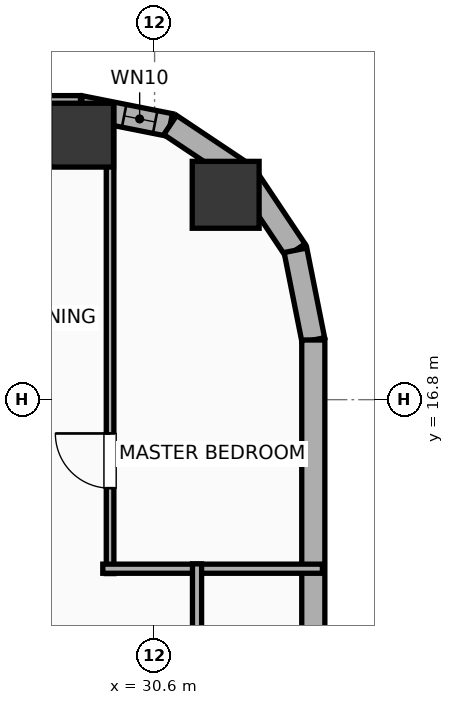
"""IFC4 building model, lengths in metres.
Left out: names, types, materials, properties, quantities, classifications, styles, units other than length and angle.
Written with IfcOpenShell. Run it as: python <this file> out.ifc"""

import sys

from ifc_helpers import new_model, si_unit, direction, frame, frame_2d, origin, origin_2d, place, context, subcontext, project, spatial, rectangle, hollow_rectangle, hollow_circle, extrude, element, fill, save


model = new_model("IFC4")
c1 = context("Model", 3, precision=1e-05, world=origin(), true_north=direction((0.0, 1.0)))
c2 = subcontext(c1, "Body", "Model", "MODEL_VIEW")
j1 = project(units=[si_unit("LENGTHUNIT", "METRE"), si_unit("PLANEANGLEUNIT", "RADIAN")], contexts=[c1])
p1 = place(None, origin())
s1 = spatial("IfcSite", under=j1, at=p1, CompositionType="ELEMENT")
p2 = place(p1, origin())
s2 = spatial("IfcBuilding", under=s1, at=p2, CompositionType="ELEMENT")
p3 = place(p2, frame((0.0, 0.0, 109.2)))
s3 = spatial("IfcBuildingStorey", under=s2, at=p3, CompositionType="ELEMENT", Elevation=109.2)
p4 = place(p3, frame((31.769, 20.169, 0.0), z_axis=(0.0, 0.0, 1.0), x_axis=(1.0, 0.0, 0.0)))
e1 = element("IfcColumn", 1, at=p4, inside=s3, PredefinedType="COLUMN", context=c2, shape_type="SweptSolid", body=[
    extrude(hollow_circle(Radius=0.55, WallThickness=0.036, at=origin_2d()), origin(), (0.0, 0.0, 1.0), 3.9),
])
p5 = place(p3, frame((29.4, 21.15, 0.0), z_axis=(0.0, 0.0, 1.0), x_axis=(1.0, 0.0, 0.0)))
e2 = element("IfcColumn", 2, at=p5, inside=s3, PredefinedType="COLUMN", context=c2, shape_type="SweptSolid", body=[
    extrude(hollow_rectangle(XDim=1.05, YDim=1.05, WallThickness=0.036, at=origin_2d()), origin(), (0.0, 0.0, 1.0), 3.9),
])
p6 = place(p3, frame((-25.381, 21.61, 0.0), z_axis=(0.0, 0.0, 1.0), x_axis=(1.0, 0.0, 0.0)))
e3 = element("IfcWall", 3, at=p6, inside=s3, PredefinedType="ELEMENTEDWALL", context=c2, shape_type="SweptSolid", body=[
    extrude(rectangle(XDim=54.763, YDim=0.38, at=frame_2d((27.381, 0.0))), origin(), (0.0, 0.0, 1.0), 3.65),
])
p7 = place(p6, frame((5.645, 0.0, 0.75)))
e4 = element("IfcOpeningElement", 4, at=p7, cuts=e3, PredefinedType="OPENING", context=c2, shape_type="SweptSolid", body=[
    extrude(rectangle(XDim=2.4, YDim=2.1, at=frame_2d((1.2, 1.05))), frame((0.0, 0.2, 0.0), z_axis=(0.0, -1.0, 0.0), x_axis=(1.0, 0.0, 0.0)), (0.0, 0.0, 1.0), 0.4),
])
p8 = place(p6, frame((45.067, 0.0, 0.75)))
e5 = element("IfcOpeningElement", 5, at=p8, cuts=e3, PredefinedType="OPENING", context=c2, shape_type="SweptSolid", body=[
    extrude(rectangle(XDim=2.4, YDim=2.1, at=frame_2d((1.2, 1.05))), frame((0.0, 0.2, 0.0), z_axis=(0.0, -1.0, 0.0), x_axis=(1.0, 0.0, 0.0)), (0.0, 0.0, 1.0), 0.4),
])
p9 = place(p6, frame((1.831, 0.0, 0.75)))
e6 = element("IfcOpeningElement", 6, at=p9, cuts=e3, PredefinedType="OPENING", context=c2, shape_type="SweptSolid", body=[
    extrude(rectangle(XDim=1.2, YDim=2.05, at=frame_2d((0.6, 1.025))), frame((0.0, 0.2, 0.0), z_axis=(0.0, -1.0, 0.0), x_axis=(1.0, 0.0, 0.0)), (0.0, 0.0, 1.0), 0.4),
])
p10 = place(p6, frame((8.996, 0.0, 0.75)))
e7 = element("IfcOpeningElement", 7, at=p10, cuts=e3, PredefinedType="OPENING", context=c2, shape_type="SweptSolid", body=[
    extrude(rectangle(XDim=1.2, YDim=2.05, at=frame_2d((0.6, 1.025))), frame((0.0, 0.2, 0.0), z_axis=(0.0, -1.0, 0.0), x_axis=(1.0, 0.0, 0.0)), (0.0, 0.0, 1.0), 0.4),
])
p11 = place(p6, frame((15.102, 0.0, 0.75)))
e8 = element("IfcOpeningElement", 8, at=p11, cuts=e3, PredefinedType="OPENING", context=c2, shape_type="SweptSolid", body=[
    extrude(rectangle(XDim=1.2, YDim=2.05, at=frame_2d((0.6, 1.025))), frame((0.0, 0.2, 0.0), z_axis=(0.0, -1.0, 0.0), x_axis=(1.0, 0.0, 0.0)), (0.0, 0.0, 1.0), 0.4),
])
p12 = place(p6, frame((12.352, 0.0, 0.75)))
e9 = element("IfcOpeningElement", 9, at=p12, cuts=e3, PredefinedType="OPENING", context=c2, shape_type="SweptSolid", body=[
    extrude(rectangle(XDim=1.2, YDim=2.05, at=frame_2d((0.6, 1.025))), frame((0.0, 0.2, 0.0), z_axis=(0.0, -1.0, 0.0), x_axis=(1.0, 0.0, 0.0)), (0.0, 0.0, 1.0), 0.4),
])
p13 = place(p6, frame((19.936, 0.0, 0.75)))
e10 = element("IfcOpeningElement", 10, at=p13, cuts=e3, PredefinedType="OPENING", context=c2, shape_type="SweptSolid", body=[
    extrude(rectangle(XDim=1.2, YDim=2.05, at=frame_2d((0.6, 1.025))), frame((0.0, 0.2, 0.0), z_axis=(0.0, -1.0, 0.0), x_axis=(1.0, 0.0, 0.0)), (0.0, 0.0, 1.0), 0.4),
])
p14 = place(p6, frame((17.786, 0.0, 0.75)))
e11 = element("IfcOpeningElement", 11, at=p14, cuts=e3, PredefinedType="OPENING", context=c2, shape_type="SweptSolid", body=[
    extrude(rectangle(XDim=1.2, YDim=2.05, at=frame_2d((0.6, 1.025))), frame((0.0, 0.2, 0.0), z_axis=(0.0, -1.0, 0.0), x_axis=(1.0, 0.0, 0.0)), (0.0, 0.0, 1.0), 0.4),
])
p15 = place(p6, frame((23.826, 0.0, 0.75)))
e12 = element("IfcOpeningElement", 12, at=p15, cuts=e3, PredefinedType="OPENING", context=c2, shape_type="SweptSolid", body=[
    extrude(rectangle(XDim=1.2, YDim=2.05, at=frame_2d((0.6, 1.025))), frame((0.0, 0.2, 0.0), z_axis=(0.0, -1.0, 0.0), x_axis=(1.0, 0.0, 0.0)), (0.0, 0.0, 1.0), 0.4),
])
p16 = place(p6, frame((26.576, 0.0, 0.75)))
e13 = element("IfcOpeningElement", 13, at=p16, cuts=e3, PredefinedType="OPENING", context=c2, shape_type="SweptSolid", body=[
    extrude(rectangle(XDim=1.2, YDim=2.05, at=frame_2d((0.6, 1.025))), frame((0.0, 0.2, 0.0), z_axis=(0.0, -1.0, 0.0), x_axis=(1.0, 0.0, 0.0)), (0.0, 0.0, 1.0), 0.4),
])
p17 = place(p6, frame((30.431, 0.0, 0.75)))
e14 = element("IfcOpeningElement", 14, at=p17, cuts=e3, PredefinedType="OPENING", context=c2, shape_type="SweptSolid", body=[
    extrude(rectangle(XDim=1.2, YDim=2.05, at=frame_2d((0.6, 1.025))), frame((0.0, 0.2, 0.0), z_axis=(0.0, -1.0, 0.0), x_axis=(1.0, 0.0, 0.0)), (0.0, 0.0, 1.0), 0.4),
])
p18 = place(p6, frame((38.581, 0.0, 0.75)))
e15 = element("IfcOpeningElement", 15, at=p18, cuts=e3, PredefinedType="OPENING", context=c2, shape_type="SweptSolid", body=[
    extrude(rectangle(XDim=1.2, YDim=2.05, at=frame_2d((0.6, 1.025))), frame((0.0, 0.2, 0.0), z_axis=(0.0, -1.0, 0.0), x_axis=(1.0, 0.0, 0.0)), (0.0, 0.0, 1.0), 0.4),
])
p19 = place(p6, frame((34.786, 0.0, 0.75)))
e16 = element("IfcOpeningElement", 16, at=p19, cuts=e3, PredefinedType="OPENING", context=c2, shape_type="SweptSolid", body=[
    extrude(rectangle(XDim=1.2, YDim=2.05, at=frame_2d((0.6, 1.025))), frame((0.0, 0.2, 0.0), z_axis=(0.0, -1.0, 0.0), x_axis=(1.0, 0.0, 0.0)), (0.0, 0.0, 1.0), 0.4),
])
p20 = place(p6, frame((41.876, 0.0, 0.75)))
e17 = element("IfcOpeningElement", 17, at=p20, cuts=e3, PredefinedType="OPENING", context=c2, shape_type="SweptSolid", body=[
    extrude(rectangle(XDim=1.2, YDim=2.05, at=frame_2d((0.6, 1.025))), frame((0.0, 0.2, 0.0), z_axis=(0.0, -1.0, 0.0), x_axis=(1.0, 0.0, 0.0)), (0.0, 0.0, 1.0), 0.4),
])
p21 = place(p6, frame((49.385, 0.0, 0.75)))
e18 = element("IfcOpeningElement", 18, at=p21, cuts=e3, PredefinedType="OPENING", context=c2, shape_type="SweptSolid", body=[
    extrude(rectangle(XDim=1.2, YDim=2.05, at=frame_2d((0.6, 1.025))), frame((0.0, 0.2, 0.0), z_axis=(0.0, -1.0, 0.0), x_axis=(1.0, 0.0, 0.0)), (0.0, 0.0, 1.0), 0.4),
])
p22 = place(p6, frame((52.181, 0.0, 0.75)))
e19 = element("IfcOpeningElement", 19, at=p22, cuts=e3, PredefinedType="OPENING", context=c2, shape_type="SweptSolid", body=[
    extrude(rectangle(XDim=1.2, YDim=2.05, at=frame_2d((0.6, 1.025))), frame((0.0, 0.2, 0.0), z_axis=(0.0, -1.0, 0.0), x_axis=(1.0, 0.0, 0.0)), (0.0, 0.0, 1.0), 0.4),
])
p23 = place(p3, frame((29.381, 21.61, 0.0), z_axis=(0.0, 0.0, 1.0), x_axis=(0.980755066645, -0.195242155415, 0.0)))
e20 = element("IfcWall", 20, at=p23, inside=s3, PredefinedType="ELEMENTEDWALL", context=c2, shape_type="SweptSolid", body=[
    extrude(rectangle(XDim=1.504, YDim=0.38, at=frame_2d((0.752, 0.0))), origin(), (0.0, 0.0, 1.0), 3.65),
])
p24 = place(p23, frame((0.732, 0.0, 0.75)))
e21 = element("IfcOpeningElement", 21, at=p24, cuts=e20, PredefinedType="OPENING", context=c2, shape_type="SweptSolid", body=[
    extrude(rectangle(XDim=0.52, YDim=2.05, at=frame_2d((0.26, 1.025))), frame((0.0, 0.2, 0.0), z_axis=(0.0, -1.0, 0.0), x_axis=(1.0, 0.0, 0.0)), (0.0, 0.0, 1.0), 0.4),
])
p25 = place(p3, frame((30.857, 21.316, 0.0), z_axis=(0.0, 0.0, 1.0), x_axis=(0.831468045563, -0.555572577804, 0.0)))
e22 = element("IfcWall", 22, at=p25, inside=s3, PredefinedType="ELEMENTEDWALL", context=c2, shape_type="SweptSolid", body=[
    extrude(rectangle(XDim=1.485, YDim=0.38, at=frame_2d((0.742, 0.0))), origin(), (0.0, 0.0, 1.0), 3.65),
])
p26 = place(p3, frame((32.091, 20.491, 0.0), z_axis=(0.0, 0.0, 1.0), x_axis=(0.555610286119, -0.831442848281, 0.0)))
e23 = element("IfcWall", 23, at=p26, inside=s3, PredefinedType="ELEMENTEDWALL", context=c2, shape_type="SweptSolid", body=[
    extrude(rectangle(XDim=1.485, YDim=0.38, at=frame_2d((0.743, 0.0))), origin(), (0.0, 0.0, 1.0), 3.65),
])
p27 = place(p3, frame((32.917, 19.257, 0.0), z_axis=(0.0, 0.0, 1.0), x_axis=(0.195086038585, -0.980786132421, 0.0)))
e24 = element("IfcWall", 24, at=p27, inside=s3, PredefinedType="ELEMENTEDWALL", context=c2, shape_type="SweptSolid", body=[
    extrude(rectangle(XDim=1.504, YDim=0.38, at=frame_2d((0.752, 0.0))), origin(), (0.0, 0.0, 1.0), 3.65),
])
p28 = place(p3, frame((33.21, 17.781, 0.0), z_axis=(0.0, 0.0, 1.0), x_axis=(0.0, -1.0, 0.0)))
e25 = element("IfcWall", 25, at=p28, inside=s3, PredefinedType="ELEMENTEDWALL", context=c2, shape_type="SweptSolid", body=[
    extrude(rectangle(XDim=34.363, YDim=0.38, at=frame_2d((17.181, 0.0))), origin(), (0.0, 0.0, 1.0), 3.65),
])
p29 = place(p28, frame((32.008, 0.0, 0.75)))
e26 = element("IfcOpeningElement", 26, at=p29, cuts=e25, PredefinedType="OPENING", context=c2, shape_type="SweptSolid", body=[
    extrude(rectangle(XDim=1.2, YDim=2.05, at=frame_2d((0.6, 1.025))), frame((0.0, 0.2, 0.0), z_axis=(0.0, -1.0, 0.0), x_axis=(1.0, 0.0, 0.0)), (0.0, 0.0, 1.0), 0.4),
])
p30 = place(p28, frame((12.486, 0.0, 0.75)))
e27 = element("IfcOpeningElement", 27, at=p30, cuts=e25, PredefinedType="OPENING", context=c2, shape_type="SweptSolid", body=[
    extrude(rectangle(XDim=1.2, YDim=2.05, at=frame_2d((0.6, 1.025))), frame((0.0, 0.2, 0.0), z_axis=(0.0, -1.0, 0.0), x_axis=(1.0, 0.0, 0.0)), (0.0, 0.0, 1.0), 0.4),
])
p31 = place(p28, frame((21.736, 0.0, 0.75)))
e28 = element("IfcOpeningElement", 28, at=p31, cuts=e25, PredefinedType="OPENING", context=c2, shape_type="SweptSolid", body=[
    extrude(rectangle(XDim=1.2, YDim=2.05, at=frame_2d((0.6, 1.025))), frame((0.0, 0.2, 0.0), z_axis=(0.0, -1.0, 0.0), x_axis=(1.0, 0.0, 0.0)), (0.0, 0.0, 1.0), 0.4),
])
p32 = place(p3, frame((29.868, 13.94, 0.0), z_axis=(0.0, 0.0, 1.0), x_axis=(0.0, 1.0, 0.0)))
e29 = element("IfcWall", 29, at=p32, inside=s3, PredefinedType="PARTITIONING", context=c2, shape_type="SweptSolid", body=[
    extrude(rectangle(XDim=7.726, YDim=0.125, at=frame_2d((3.863, 0.0))), origin(), (0.0, 0.0, 1.0), 3.65),
])
p33 = place(p32, frame((1.404, 0.0, 0.0)))
e30 = element("IfcOpeningElement", 30, at=p33, cuts=e29, PredefinedType="OPENING", context=c2, shape_type="SweptSolid", body=[
    extrude(rectangle(XDim=0.9, YDim=2.05, at=frame_2d((0.45, 1.025))), frame((0.0, 0.073, 0.0), z_axis=(0.0, -1.0, 0.0), x_axis=(1.0, 0.0, 0.0)), (0.0, 0.0, 1.0), 0.145),
])
p34 = place(p3, frame((29.748, 14.02, 0.0), z_axis=(0.0, 0.0, 1.0), x_axis=(1.0, 0.0, 0.0)))
e31 = element("IfcWall", 31, at=p34, inside=s3, PredefinedType="PLUMBINGWALL", context=c2, shape_type="SweptSolid", body=[
    extrude(rectangle(XDim=3.612, YDim=0.15, at=frame_2d((1.806, 0.0))), origin(), (0.0, 0.0, 1.0), 3.65),
])
p35 = place(p3, frame((31.298, 10.78, 0.0), z_axis=(0.0, 0.0, 1.0), x_axis=(0.0, 1.0, 0.0)))
e32 = element("IfcWall", 32, at=p35, inside=s3, PredefinedType="PLUMBINGWALL", context=c2, shape_type="SweptSolid", body=[
    extrude(rectangle(XDim=3.32, YDim=0.15, at=frame_2d((1.66, 0.0))), origin(), (0.0, 0.0, 1.0), 3.65),
])
p36 = place(p35, frame((1.21, 0.0, 0.0)))
e33 = element("IfcOpeningElement", 33, at=p36, cuts=e32, PredefinedType="OPENING", context=c2, shape_type="SweptSolid", body=[
    extrude(rectangle(XDim=0.9, YDim=2.05, at=frame_2d((0.45, 1.025))), frame((0.0, 0.085, 0.0), z_axis=(0.0, -1.0, 0.0), x_axis=(1.0, 0.0, 0.0)), (0.0, 0.0, 1.0), 0.17),
])
p37 = place(p24, origin())
e34 = element("IfcWindow", 34, at=p37, inside=s3, PartitioningType="SINGLE_PANEL", PredefinedType="WINDOW", context=c2, shape_type="SweptSolid", body=[
    extrude(rectangle(XDim=0.52, YDim=2.05, at=frame_2d((0.26, 1.025))), frame((0.0, 0.03, 0.0), z_axis=(0.0, -1.0, 0.0), x_axis=(1.0, 0.0, 0.0)), (0.0, 0.0, 1.0), 0.06),
])
fill(e21, e34)
p38 = place(p33, origin())
e35 = element("IfcDoor", 35, at=p38, inside=s3, OperationType="SINGLE_SWING_RIGHT", PredefinedType="DOOR", context=c2, shape_type="SweptSolid", body=[
    extrude(rectangle(XDim=0.9, YDim=2.05, at=frame_2d((0.45, 1.025))), frame((0.0, 0.025, 0.0), z_axis=(0.0, -1.0, 0.0), x_axis=(1.0, 0.0, 0.0)), (0.0, 0.0, 1.0), 0.05),
])
fill(e30, e35)
save(model, sys.argv[1])
